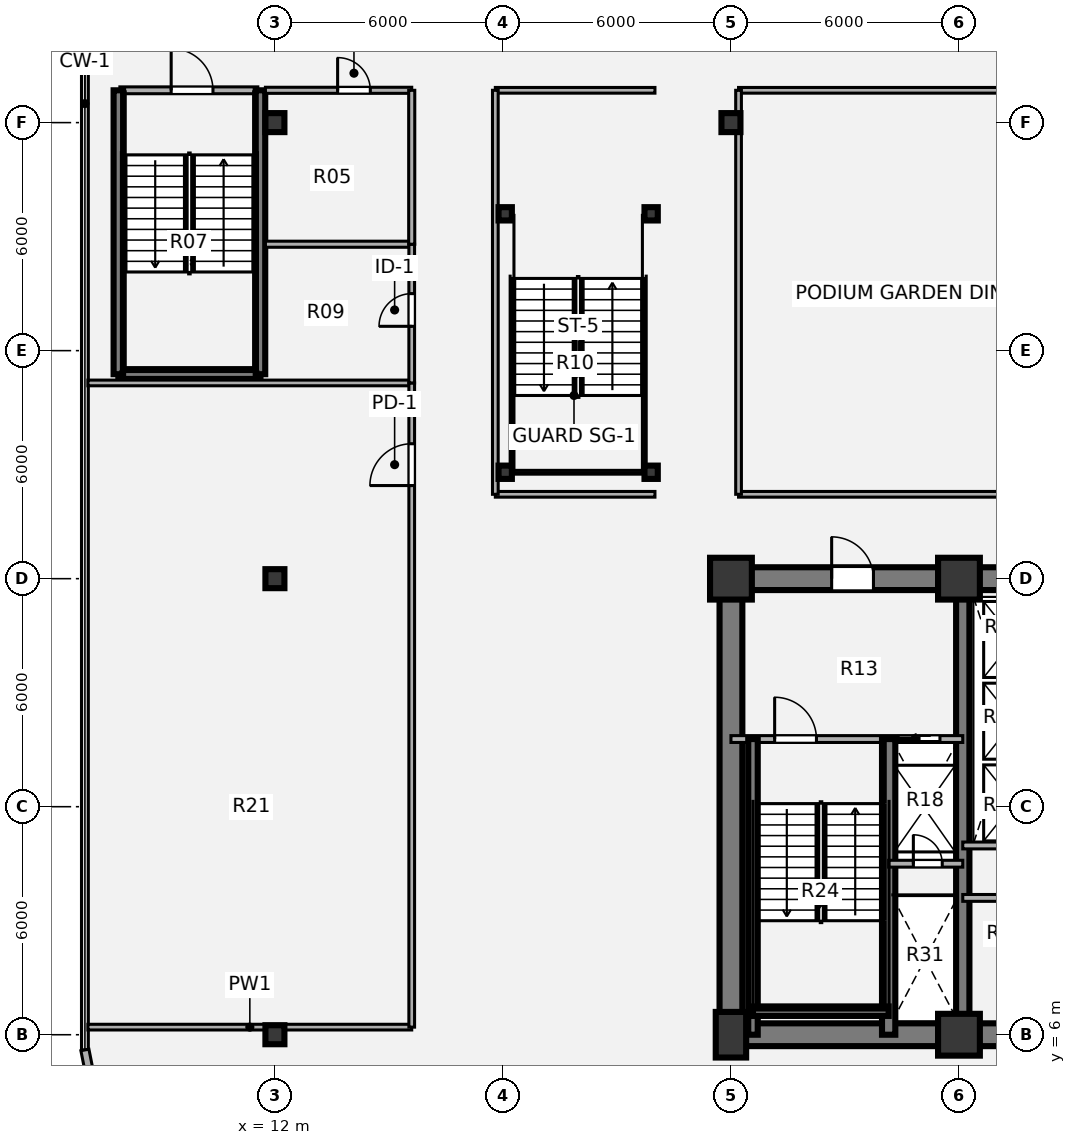
"""IFC4 building model, lengths in metres.
Left out: names, types, materials, properties, quantities, classifications, styles, units other than length and angle.
Written with IfcOpenShell. Run it as: python <this file> out.ifc"""

import sys

from ifc_helpers import new_model, si_unit, direction, frame, frame_2d, origin, origin_2d, place, context, subcontext, project, spatial, rectangle, hollow_rectangle, i_section, extrude, source, transform, mapped, element, fill, save


model = new_model("IFC4")
c1 = context("Model", 3, precision=1e-05, world=origin(), true_north=direction((0.0, 1.0)))
c2 = subcontext(c1, "Body", "Model", "MODEL_VIEW")
j1 = project(units=[si_unit("LENGTHUNIT", "METRE"), si_unit("PLANEANGLEUNIT", "RADIAN")], contexts=[c1])
p1 = place(None, origin())
s1 = spatial("IfcSite", under=j1, at=p1, CompositionType="ELEMENT")
p2 = place(p1, origin())
s2 = spatial("IfcBuilding", under=s1, at=p2, CompositionType="ELEMENT")
p3 = place(p2, frame((0.0, 0.0, 14.04)))
s3 = spatial("IfcBuildingStorey", under=s2, at=p3, CompositionType="ELEMENT", Elevation=14.04)
m1 = source(origin(), c2, "Body", "SweptSolid", [
    extrude(rectangle(XDim=0.8, YDim=1.2, at=origin_2d()), origin(), (0.0, 0.0, 1.0), 4.32),
])
p4 = place(p3, frame((24.0, 6.0, 0.0), z_axis=(0.0, 0.0, 1.0), x_axis=(1.0, 0.0, 0.0)))
e1 = element("IfcColumn", 1, at=p4, inside=s3, PredefinedType="COLUMN", context=c2, shape_type="MappedRepresentation", body=[
    mapped(m1, transform((0.0, 0.0, 0.0), x_axis=(1.0, 0.0, 0.0), y_axis=(0.0, 1.0, 0.0), z_axis=(0.0, 0.0, 1.0), scale=1.0)),
])
m2 = source(origin(), c2, "Body", "SweptSolid", [
    extrude(rectangle(XDim=1.1, YDim=1.1, at=origin_2d()), origin(), (0.0, 0.0, 1.0), 4.32),
])
for number, where, z_axis, x_axis in (
    (2, (30.0, 6.0, 0.0), (0.0, 0.0, 1.0), (1.0, 0.0, 0.0)),
    (3, (24.0, 18.0, 0.0), (0.0, 0.0, 1.0), (1.0, 0.0, 0.0)),
    (4, (30.0, 18.0, 0.0), (0.0, 0.0, 1.0), (1.0, 0.0, 0.0)),
):
    element("IfcColumn", number, at=place(p3, frame(where, z_axis=z_axis, x_axis=x_axis)), inside=s3, PredefinedType="COLUMN", context=c2, shape_type="MappedRepresentation", body=[
        mapped(m2, transform((0.0, 0.0, 0.0), x_axis=(1.0, 0.0, 0.0), y_axis=(0.0, 1.0, 0.0), z_axis=(0.0, 0.0, 1.0), scale=1.0)),
    ])
p5 = place(p3, frame((48.3, 6.0, 0.0), z_axis=(0.0, 0.0, 1.0), x_axis=(-1.0, 0.0, 0.0)))
e5 = element("IfcWall", 5, at=p5, inside=s3, PredefinedType="SHEAR", context=c2, shape_type="SweptSolid", body=[
    extrude(rectangle(XDim=24.6, YDim=0.6, at=frame_2d((12.3, 0.0))), origin(), (0.0, 0.0, 1.0), 4.32),
])
p6 = place(p3, frame((24.0, 6.0, 0.0), z_axis=(0.0, 0.0, 1.0), x_axis=(0.0, 1.0, 0.0)))
e6 = element("IfcWall", 6, at=p6, inside=s3, PredefinedType="SHEAR", context=c2, shape_type="SweptSolid", body=[
    extrude(rectangle(XDim=12.0, YDim=0.6, at=frame_2d((6.0, 0.0))), origin(), (0.0, 0.0, 1.0), 4.32),
])
p7 = place(p3, frame((23.7, 18.0, 0.0), z_axis=(0.0, 0.0, 1.0), x_axis=(1.0, 0.0, 0.0)))
e7 = element("IfcWall", 7, at=p7, inside=s3, PredefinedType="SHEAR", context=c2, shape_type="SweptSolid", body=[
    extrude(rectangle(XDim=9.5, YDim=0.6, at=frame_2d((4.75, 0.0))), origin(), (0.0, 0.0, 1.0), 4.32),
])
p8 = place(p7, frame((2.95, 0.0, 0.0)))
e8 = element("IfcOpeningElement", 8, at=p8, cuts=e7, PredefinedType="OPENING", context=c2, shape_type="SweptSolid", body=[
    extrude(rectangle(XDim=1.1, YDim=2.1, at=origin_2d()), frame((0.55, 0.31, 1.05), z_axis=(0.0, -1.0, 0.0), x_axis=(1.0, 0.0, 0.0)), (0.0, 0.0, 1.0), 0.62),
])
p9 = place(p3, frame((30.1, 6.0, 0.0), z_axis=(0.0, 0.0, 1.0), x_axis=(0.0, 1.0, 0.0)))
e9 = element("IfcWall", 9, at=p9, inside=s3, PredefinedType="SHEAR", context=c2, shape_type="SweptSolid", body=[
    extrude(rectangle(XDim=12.0, YDim=0.35, at=frame_2d((6.0, 0.0))), origin(), (0.0, 0.0, 1.0), 4.32),
])
m3 = source(origin(), c2, "Body", "SweptSolid", [
    extrude(i_section(OverallWidth=0.5, OverallDepth=0.5, WebThickness=0.022, FlangeThickness=0.035, at=origin_2d()), origin(), (0.0, 0.0, 1.0), 4.32),
])
for number, where, z_axis, x_axis in (
    (10, (12.0, 6.0, 0.0), (0.0, 0.0, 1.0), (1.0, 0.0, 0.0)),
    (11, (12.0, 18.0, 0.0), (0.0, 0.0, 1.0), (1.0, 0.0, 0.0)),
    (12, (12.0, 30.0, 0.0), (0.0, 0.0, 1.0), (1.0, 0.0, 0.0)),
    (13, (24.0, 30.0, 0.0), (0.0, 0.0, 1.0), (1.0, 0.0, 0.0)),
):
    element("IfcColumn", number, at=place(p3, frame(where, z_axis=z_axis, x_axis=x_axis)), inside=s3, PredefinedType="COLUMN", context=c2, shape_type="MappedRepresentation", body=[
        mapped(m3, transform((0.0, 0.0, 0.0), x_axis=(1.0, 0.0, 0.0), y_axis=(0.0, 1.0, 0.0), z_axis=(0.0, 0.0, 1.0), scale=1.0)),
    ])
m4 = source(origin(), c2, "Body", "SweptSolid", [
    extrude(hollow_rectangle(XDim=0.35, YDim=0.35, WallThickness=0.016, OuterFilletRadius=0.032, at=origin_2d()), origin(), (0.0, 0.0, 1.0), 4.32),
])
for number, where, z_axis, x_axis in (
    (14, (18.06, 20.8, 0.0), (0.0, 0.0, 1.0), (1.0, 0.0, 0.0)),
    (15, (21.9, 20.8, 0.0), (0.0, 0.0, 1.0), (1.0, 0.0, 0.0)),
    (16, (18.06, 27.6, 0.0), (0.0, 0.0, 1.0), (1.0, 0.0, 0.0)),
    (17, (21.9, 27.6, 0.0), (0.0, 0.0, 1.0), (1.0, 0.0, 0.0)),
):
    element("IfcColumn", number, at=place(p3, frame(where, z_axis=z_axis, x_axis=x_axis)), inside=s3, PredefinedType="COLUMN", context=c2, shape_type="MappedRepresentation", body=[
        mapped(m4, transform((0.0, 0.0, 0.0), x_axis=(1.0, 0.0, 0.0), y_axis=(0.0, 1.0, 0.0), z_axis=(0.0, 0.0, 1.0), scale=1.0)),
    ])
p10 = place(p3, frame((7.244, 4.375, 0.0), z_axis=(0.0, 0.0, 1.0), x_axis=(-0.195138390419, 0.980775717779, 0.0)))
e18 = element("IfcWall", 18, at=p10, inside=s3, PredefinedType="SOLIDWALL", context=c2, shape_type="SweptSolid", body=[
    extrude(rectangle(XDim=1.249, YDim=0.215, at=frame_2d((0.624, 0.0))), origin(), (0.0, 0.0, 1.0), 4.04),
])
p11 = place(p3, frame((7.92, 30.85, 0.0), z_axis=(0.0, 0.0, 1.0), x_axis=(1.0, 0.0, 0.0)))
e19 = element("IfcWall", 19, at=p11, inside=s3, PredefinedType="PARTITIONING", context=c2, shape_type="SweptSolid", body=[
    extrude(rectangle(XDim=3.63, YDim=0.18, at=frame_2d((1.815, 0.0))), origin(), (0.0, 0.0, 1.0), 4.04),
])
p12 = place(p11, frame((1.35, 0.0, 0.0)))
e20 = element("IfcOpeningElement", 20, at=p12, cuts=e19, PredefinedType="OPENING", context=c2, shape_type="SweptSolid", body=[
    extrude(rectangle(XDim=1.1, YDim=2.1, at=origin_2d()), frame((0.55, 0.1, 1.05), z_axis=(0.0, -1.0, 0.0), x_axis=(1.0, 0.0, 0.0)), (0.0, 0.0, 1.0), 0.2),
])
p13 = place(p3, frame((7.88, 23.38, 0.0), z_axis=(0.0, 0.0, 1.0), x_axis=(1.0, 0.0, 0.0)))
e21 = element("IfcWall", 21, at=p13, inside=s3, PredefinedType="SHEAR", context=c2, shape_type="SweptSolid", body=[
    extrude(rectangle(XDim=3.74, YDim=0.25, at=frame_2d((1.87, 0.0))), origin(), (0.0, 0.0, 1.0), 4.32),
])
for number, where, z_axis, x_axis in (
    (22, (7.88, 23.38, 0.0), (0.0, 0.0, 1.0), (0.0, 1.0, 0.0)),
    (23, (11.62, 23.38, 0.0), (0.0, 0.0, 1.0), (0.0, 1.0, 0.0)),
):
    element("IfcWall", number, at=place(p3, frame(where, z_axis=z_axis, x_axis=x_axis)), inside=s3, PredefinedType="SHEAR", context=c2, shape_type="SweptSolid", body=[
        extrude(rectangle(XDim=7.47, YDim=0.25, at=frame_2d((3.735, 0.0))), origin(), (0.0, 0.0, 1.0), 4.32),
    ])
for number, where, z_axis, x_axis in (
    (24, (30.1, 10.98, 0.0), (0.0, 0.0, 1.0), (1.0, 0.0, 0.0)),
    (25, (30.1, 9.6, 0.0), (0.0, 0.0, 1.0), (1.0, 0.0, 0.0)),
):
    element("IfcWall", number, at=place(p3, frame(where, z_axis=z_axis, x_axis=x_axis)), inside=s3, PredefinedType="PARTITIONING", context=c2, shape_type="SweptSolid", body=[
        extrude(rectangle(XDim=2.5, YDim=0.18, at=frame_2d((1.25, 0.0))), origin(), (0.0, 0.0, 1.0), 4.01),
    ])
p14 = place(p3, frame((24.0, 13.78, 0.0), z_axis=(0.0, 0.0, 1.0), x_axis=(1.0, 0.0, 0.0)))
e26 = element("IfcWall", 26, at=p14, inside=s3, PredefinedType="PARTITIONING", context=c2, shape_type="SweptSolid", body=[
    extrude(rectangle(XDim=6.1, YDim=0.18, at=frame_2d((3.05, 0.0))), origin(), (0.0, 0.0, 1.0), 4.01),
])
p15 = place(p14, frame((1.15, 0.0, 0.0)))
e27 = element("IfcOpeningElement", 27, at=p15, cuts=e26, PredefinedType="OPENING", context=c2, shape_type="SweptSolid", body=[
    extrude(rectangle(XDim=1.1, YDim=2.1, at=origin_2d()), frame((0.55, 0.1, 1.05), z_axis=(0.0, -1.0, 0.0), x_axis=(1.0, 0.0, 0.0)), (0.0, 0.0, 1.0), 0.2),
])
p16 = place(p14, frame((4.4, 0.0, 0.0)))
e28 = element("IfcOpeningElement", 28, at=p16, cuts=e26, PredefinedType="OPENING", context=c2, shape_type="SweptSolid", body=[
    extrude(rectangle(XDim=1.1, YDim=2.1, at=origin_2d()), frame((0.55, 0.1, 1.05), z_axis=(0.0, -1.0, 0.0), x_axis=(1.0, 0.0, 0.0)), (0.0, 0.0, 1.0), 0.2),
])
p17 = place(p3, frame((28.15, 6.0, 0.0), z_axis=(0.0, 0.0, 1.0), x_axis=(0.0, 1.0, 0.0)))
e29 = element("IfcWall", 29, at=p17, inside=s3, PredefinedType="SHEAR", context=c2, shape_type="SweptSolid", body=[
    extrude(rectangle(XDim=7.78, YDim=0.35, at=frame_2d((3.89, 0.0))), origin(), (0.0, 0.0, 1.0), 4.36),
])
p18 = place(p3, frame((24.58, 6.0, 0.0), z_axis=(0.0, 0.0, 1.0), x_axis=(0.0, 1.0, 0.0)))
e30 = element("IfcWall", 30, at=p18, inside=s3, PredefinedType="SHEAR", context=c2, shape_type="SweptSolid", body=[
    extrude(rectangle(XDim=7.78, YDim=0.25, at=frame_2d((3.89, 0.0))), origin(), (0.0, 0.0, 1.0), 4.36),
])
p19 = place(p3, frame((24.58, 6.62, 0.0), z_axis=(0.0, 0.0, 1.0), x_axis=(1.0, 0.0, 0.0)))
e31 = element("IfcWall", 31, at=p19, inside=s3, PredefinedType="SHEAR", context=c2, shape_type="SweptSolid", body=[
    extrude(rectangle(XDim=3.57, YDim=0.25, at=frame_2d((1.785, 0.0))), origin(), (0.0, 0.0, 1.0), 4.36),
])
p20 = place(p3, frame((28.15, 10.5, 0.0), z_axis=(0.0, 0.0, 1.0), x_axis=(1.0, 0.0, 0.0)))
e32 = element("IfcWall", 32, at=p20, inside=s3, PredefinedType="PARTITIONING", context=c2, shape_type="SweptSolid", body=[
    extrude(rectangle(XDim=1.95, YDim=0.18, at=frame_2d((0.975, 0.0))), origin(), (0.0, 0.0, 1.0), 4.01),
])
p21 = place(p20, frame((0.65, 0.0, 0.0)))
e33 = element("IfcOpeningElement", 33, at=p21, cuts=e32, PredefinedType="OPENING", context=c2, shape_type="SweptSolid", body=[
    extrude(rectangle(XDim=0.76, YDim=2.05, at=origin_2d()), frame((0.38, 0.1, 1.025), z_axis=(0.0, -1.0, 0.0), x_axis=(1.0, 0.0, 0.0)), (0.0, 0.0, 1.0), 0.2),
])
p22 = place(p3, frame((7.08, 6.2, 0.0), z_axis=(0.0, 0.0, 1.0), x_axis=(1.0, 0.0, 0.0)))
e34 = element("IfcWall", 34, at=p22, inside=s3, PredefinedType="PARTITIONING", context=c2, shape_type="SweptSolid", body=[
    extrude(rectangle(XDim=8.52, YDim=0.15, at=frame_2d((4.26, 0.0))), origin(), (0.0, 0.0, 1.0), 3.325),
])
p23 = place(p3, frame((17.8, 20.22, 0.0), z_axis=(0.0, 0.0, 1.0), x_axis=(1.0, 0.0, 0.0)))
e35 = element("IfcWall", 35, at=p23, inside=s3, PredefinedType="PARTITIONING", context=c2, shape_type="SweptSolid", body=[
    extrude(rectangle(XDim=4.2, YDim=0.15, at=frame_2d((2.1, 0.0))), origin(), (0.0, 0.0, 1.0), 4.01),
])
p24 = place(p3, frame((24.2, 20.22, 0.0), z_axis=(0.0, 0.0, 1.0), x_axis=(1.0, 0.0, 0.0)))
e36 = element("IfcWall", 36, at=p24, inside=s3, PredefinedType="PARTITIONING", context=c2, shape_type="SweptSolid", body=[
    extrude(rectangle(XDim=23.6, YDim=0.15, at=frame_2d((11.8, 0.0))), origin(), (0.0, 0.0, 1.0), 4.01),
])
p25 = place(p3, frame((7.08, 23.15, 0.0), z_axis=(0.0, 0.0, 1.0), x_axis=(1.0, 0.0, 0.0)))
e37 = element("IfcWall", 37, at=p25, inside=s3, PredefinedType="PARTITIONING", context=c2, shape_type="SweptSolid", body=[
    extrude(rectangle(XDim=8.52, YDim=0.15, at=frame_2d((4.26, 0.0))), origin(), (0.0, 0.0, 1.0), 4.01),
])
p26 = place(p3, frame((11.75, 26.8, 0.0), z_axis=(0.0, 0.0, 1.0), x_axis=(1.0, 0.0, 0.0)))
e38 = element("IfcWall", 38, at=p26, inside=s3, PredefinedType="PLUMBINGWALL", context=c2, shape_type="SweptSolid", body=[
    extrude(rectangle(XDim=3.85, YDim=0.16, at=frame_2d((1.925, 0.0))), origin(), (0.0, 0.0, 1.0), 4.01),
])
p27 = place(p3, frame((11.75, 30.85, 0.0), z_axis=(0.0, 0.0, 1.0), x_axis=(1.0, 0.0, 0.0)))
e39 = element("IfcWall", 39, at=p27, inside=s3, PredefinedType="PLUMBINGWALL", context=c2, shape_type="SweptSolid", body=[
    extrude(rectangle(XDim=3.85, YDim=0.16, at=frame_2d((1.925, 0.0))), origin(), (0.0, 0.0, 1.0), 4.01),
])
p28 = place(p27, frame((1.9, 0.0, 0.0)))
e40 = element("IfcOpeningElement", 40, at=p28, cuts=e39, PredefinedType="OPENING", context=c2, shape_type="SweptSolid", body=[
    extrude(rectangle(XDim=0.86, YDim=2.1, at=origin_2d()), frame((0.43, 0.09, 1.05), z_axis=(0.0, -1.0, 0.0), x_axis=(1.0, 0.0, 0.0)), (0.0, 0.0, 1.0), 0.18),
])
p29 = place(p3, frame((17.8, 30.85, 0.0), z_axis=(0.0, 0.0, 1.0), x_axis=(1.0, 0.0, 0.0)))
e41 = element("IfcWall", 41, at=p29, inside=s3, PredefinedType="PARTITIONING", context=c2, shape_type="SweptSolid", body=[
    extrude(rectangle(XDim=4.2, YDim=0.15, at=frame_2d((2.1, 0.0))), origin(), (0.0, 0.0, 1.0), 4.01),
])
p30 = place(p3, frame((24.2, 30.85, 0.0), z_axis=(0.0, 0.0, 1.0), x_axis=(1.0, 0.0, 0.0)))
e42 = element("IfcWall", 42, at=p30, inside=s3, PredefinedType="PARTITIONING", context=c2, shape_type="SweptSolid", body=[
    extrude(rectangle(XDim=23.6, YDim=0.15, at=frame_2d((11.8, 0.0))), origin(), (0.0, 0.0, 1.0), 4.01),
])
p31 = place(p30, frame((13.515, 0.0, 0.0)))
e43 = element("IfcOpeningElement", 43, at=p31, cuts=e42, PredefinedType="OPENING", context=c2, shape_type="SweptSolid", body=[
    extrude(rectangle(XDim=1.05, YDim=2.1, at=origin_2d()), frame((0.525, 0.085, 1.05), z_axis=(0.0, -1.0, 0.0), x_axis=(1.0, 0.0, 0.0)), (0.0, 0.0, 1.0), 0.17),
])
p32 = place(p3, frame((15.6, 6.2, 0.0), z_axis=(0.0, 0.0, 1.0), x_axis=(0.0, 1.0, 0.0)))
e44 = element("IfcWall", 44, at=p32, inside=s3, PredefinedType="PARTITIONING", context=c2, shape_type="SweptSolid", body=[
    extrude(rectangle(XDim=16.95, YDim=0.15, at=frame_2d((8.475, 0.0))), origin(), (0.0, 0.0, 1.0), 3.666),
])
p33 = place(p32, frame((14.25, 0.0, 0.0)))
e45 = element("IfcOpeningElement", 45, at=p33, cuts=e44, PredefinedType="OPENING", context=c2, shape_type="SweptSolid", body=[
    extrude(rectangle(XDim=1.1, YDim=2.1, at=origin_2d()), frame((0.55, 0.085, 1.05), z_axis=(0.0, -1.0, 0.0), x_axis=(1.0, 0.0, 0.0)), (0.0, 0.0, 1.0), 0.17),
])
p34 = place(p3, frame((15.6, 23.15, 0.0), z_axis=(0.0, 0.0, 1.0), x_axis=(0.0, 1.0, 0.0)))
e46 = element("IfcWall", 46, at=p34, inside=s3, PredefinedType="PARTITIONING", context=c2, shape_type="SweptSolid", body=[
    extrude(rectangle(XDim=3.65, YDim=0.15, at=frame_2d((1.825, 0.0))), origin(), (0.0, 0.0, 1.0), 3.666),
])
p35 = place(p34, frame((1.49, 0.0, 0.0)))
e47 = element("IfcOpeningElement", 47, at=p35, cuts=e46, PredefinedType="OPENING", context=c2, shape_type="SweptSolid", body=[
    extrude(rectangle(XDim=0.86, YDim=2.1, at=origin_2d()), frame((0.43, 0.085, 1.05), z_axis=(0.0, -1.0, 0.0), x_axis=(1.0, 0.0, 0.0)), (0.0, 0.0, 1.0), 0.17),
])
p36 = place(p3, frame((15.6, 26.8, 0.0), z_axis=(0.0, 0.0, 1.0), x_axis=(0.0, 1.0, 0.0)))
e48 = element("IfcWall", 48, at=p36, inside=s3, PredefinedType="PLUMBINGWALL", context=c2, shape_type="SweptSolid", body=[
    extrude(rectangle(XDim=4.05, YDim=0.16, at=frame_2d((2.025, 0.0))), origin(), (0.0, 0.0, 1.0), 3.666),
])
p37 = place(p3, frame((17.8, 20.22, 0.0), z_axis=(0.0, 0.0, 1.0), x_axis=(0.0, 1.0, 0.0)))
e49 = element("IfcWall", 49, at=p37, inside=s3, PredefinedType="PARTITIONING", context=c2, shape_type="SweptSolid", body=[
    extrude(rectangle(XDim=10.63, YDim=0.15, at=frame_2d((5.315, 0.0))), origin(), (0.0, 0.0, 1.0), 3.666),
])
p38 = place(p3, frame((24.2, 20.22, 0.0), z_axis=(0.0, 0.0, 1.0), x_axis=(0.0, 1.0, 0.0)))
e50 = element("IfcWall", 50, at=p38, inside=s3, PredefinedType="PARTITIONING", context=c2, shape_type="SweptSolid", body=[
    extrude(rectangle(XDim=10.63, YDim=0.15, at=frame_2d((5.315, 0.0))), origin(), (0.0, 0.0, 1.0), 3.225),
])
m5 = source(origin(), c2, "Body", "SweptSolid", [
    extrude(rectangle(XDim=1.1, YDim=2.1, at=origin_2d()), frame((0.55, 0.025, 1.05), z_axis=(0.0, -1.0, 0.0), x_axis=(1.0, 0.0, 0.0)), (0.0, 0.0, 1.0), 0.05),
])
p39 = place(p12, origin())
e51 = element("IfcDoor", 51, at=p39, inside=s3, OperationType="SINGLE_SWING_LEFT", PredefinedType="DOOR", context=c2, shape_type="MappedRepresentation", body=[
    mapped(m5, transform((0.0, 0.0, 0.0), x_axis=(1.0, 0.0, 0.0), y_axis=(0.0, 1.0, 0.0), z_axis=(0.0, 0.0, 1.0), scale=1.0)),
])
fill(e20, e51)
p40 = place(p15, origin())
e52 = element("IfcDoor", 52, at=p40, inside=s3, OperationType="SINGLE_SWING_LEFT", PredefinedType="DOOR", context=c2, shape_type="MappedRepresentation", body=[
    mapped(m5, transform((0.0, 0.0, 0.0), x_axis=(1.0, 0.0, 0.0), y_axis=(0.0, 1.0, 0.0), z_axis=(0.0, 0.0, 1.0), scale=1.0)),
])
fill(e27, e52)
m6 = source(origin(), c2, "Body", "SweptSolid", [
    extrude(rectangle(XDim=1.1, YDim=2.1, at=origin_2d()), frame((0.55, 0.025, 1.05), z_axis=(0.0, -1.0, 0.0), x_axis=(1.0, 0.0, 0.0)), (0.0, 0.0, 1.0), 0.05),
])
p41 = place(p16, origin())
e53 = element("IfcDoor", 53, at=p41, inside=s3, OperationType="SLIDING_TO_LEFT", PredefinedType="DOOR", context=c2, shape_type="MappedRepresentation", body=[
    mapped(m6, transform((0.0, 0.0, 0.0), x_axis=(1.0, 0.0, 0.0), y_axis=(0.0, 1.0, 0.0), z_axis=(0.0, 0.0, 1.0), scale=1.0)),
])
fill(e28, e53)
m7 = source(origin(), c2, "Body", "SweptSolid", [
    extrude(rectangle(XDim=0.76, YDim=2.05, at=origin_2d()), frame((0.38, 0.025, 1.025), z_axis=(0.0, -1.0, 0.0), x_axis=(1.0, 0.0, 0.0)), (0.0, 0.0, 1.0), 0.05),
])
p42 = place(p21, origin())
e54 = element("IfcDoor", 54, at=p42, inside=s3, OperationType="SINGLE_SWING_LEFT", PredefinedType="DOOR", context=c2, shape_type="MappedRepresentation", body=[
    mapped(m7, transform((0.0, 0.0, 0.0), x_axis=(1.0, 0.0, 0.0), y_axis=(0.0, 1.0, 0.0), z_axis=(0.0, 0.0, 1.0), scale=1.0)),
])
fill(e33, e54)
m8 = source(origin(), c2, "Body", "SweptSolid", [
    extrude(rectangle(XDim=1.1, YDim=2.1, at=origin_2d()), frame((0.55, 0.025, 1.05), z_axis=(0.0, -1.0, 0.0), x_axis=(1.0, 0.0, 0.0)), (0.0, 0.0, 1.0), 0.05),
])
p43 = place(p8, origin())
e55 = element("IfcDoor", 55, at=p43, inside=s3, OperationType="SINGLE_SWING_LEFT", PredefinedType="DOOR", context=c2, shape_type="MappedRepresentation", body=[
    mapped(m8, transform((0.0, 0.0, 0.0), x_axis=(1.0, 0.0, 0.0), y_axis=(0.0, 1.0, 0.0), z_axis=(0.0, 0.0, 1.0), scale=1.0)),
])
fill(e8, e55)
m9 = source(origin(), c2, "Body", "SweptSolid", [
    extrude(rectangle(XDim=0.86, YDim=2.1, at=origin_2d()), frame((0.43, 0.025, 1.05), z_axis=(0.0, -1.0, 0.0), x_axis=(1.0, 0.0, 0.0)), (0.0, 0.0, 1.0), 0.05),
])
p44 = place(p28, origin())
e56 = element("IfcDoor", 56, at=p44, inside=s3, OperationType="SINGLE_SWING_LEFT", PredefinedType="DOOR", context=c2, shape_type="MappedRepresentation", body=[
    mapped(m9, transform((0.0, 0.0, 0.0), x_axis=(1.0, 0.0, 0.0), y_axis=(0.0, 1.0, 0.0), z_axis=(0.0, 0.0, 1.0), scale=1.0)),
])
fill(e40, e56)
m10 = source(origin(), c2, "Body", "SweptSolid", [
    extrude(rectangle(XDim=1.1, YDim=2.1, at=origin_2d()), frame((0.55, 0.025, 1.05), z_axis=(0.0, -1.0, 0.0), x_axis=(1.0, 0.0, 0.0)), (0.0, 0.0, 1.0), 0.05),
])
p45 = place(p33, origin())
e57 = element("IfcDoor", 57, at=p45, inside=s3, OperationType="SINGLE_SWING_LEFT", PredefinedType="DOOR", context=c2, shape_type="MappedRepresentation", body=[
    mapped(m10, transform((0.0, 0.0, 0.0), x_axis=(1.0, 0.0, 0.0), y_axis=(0.0, 1.0, 0.0), z_axis=(0.0, 0.0, 1.0), scale=1.0)),
])
fill(e45, e57)
m11 = source(origin(), c2, "Body", "SweptSolid", [
    extrude(rectangle(XDim=0.86, YDim=2.1, at=origin_2d()), frame((0.43, 0.025, 1.05), z_axis=(0.0, -1.0, 0.0), x_axis=(1.0, 0.0, 0.0)), (0.0, 0.0, 1.0), 0.05),
])
p46 = place(p35, origin())
e58 = element("IfcDoor", 58, at=p46, inside=s3, OperationType="SINGLE_SWING_LEFT", PredefinedType="DOOR", context=c2, shape_type="MappedRepresentation", body=[
    mapped(m11, transform((0.0, 0.0, 0.0), x_axis=(1.0, 0.0, 0.0), y_axis=(0.0, 1.0, 0.0), z_axis=(0.0, 0.0, 1.0), scale=1.0)),
])
fill(e47, e58)
save(model, sys.argv[1])
